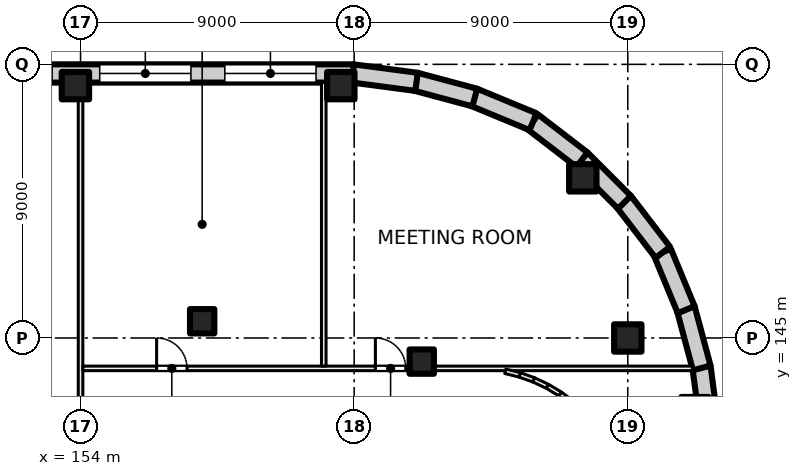
"""IFC4 building model, lengths in metres.
Left out: names, types, materials, properties, quantities, classifications, styles, units other than length and angle.
Written with IfcOpenShell. Run it as: python <this file> out.ifc"""

import sys

from ifc_helpers import new_model, si_unit, direction, frame, frame_2d, origin, origin_2d, place, context, subcontext, project, spatial, rectangle, extrude, element, fill, save


model = new_model("IFC4")
c1 = context("Model", 3, precision=1e-05, world=origin(), true_north=direction((0.0, 1.0)))
c2 = subcontext(c1, "Body", "Model", "MODEL_VIEW")
j1 = project(units=[si_unit("LENGTHUNIT", "METRE"), si_unit("PLANEANGLEUNIT", "RADIAN")], contexts=[c1])
p1 = place(None, origin())
s1 = spatial("IfcSite", under=j1, at=p1, CompositionType="ELEMENT")
p2 = place(p1, origin())
s2 = spatial("IfcBuilding", under=s1, at=p2, CompositionType="ELEMENT")
p3 = place(p2, frame((0.0, 0.0, 12.5)))
s3 = spatial("IfcBuildingStorey", under=s2, at=p3, CompositionType="ELEMENT", Elevation=12.5)
for number, where, z_axis, x_axis in (
    (1, (172.0, 145.0, 0.0), (0.0, 0.0, 1.0), (1.0, 0.0, 0.0)),
    (2, (153.831, 153.3, 0.0), (0.0, 0.0, 1.0), (1.0, 0.0, 0.0)),
    (3, (162.561, 153.3, 0.0), (0.0, 0.0, 1.0), (1.0, 0.0, 0.0)),
    (4, (170.521, 150.267, 0.0), (0.0, 0.0, 1.0), (1.0, 0.0, 0.0)),
):
    element("IfcColumn", number, at=place(p3, frame(where, z_axis=z_axis, x_axis=x_axis)), inside=s3, PredefinedType="COLUMN", context=c2, shape_type="SweptSolid", body=[
        extrude(rectangle(XDim=0.9, YDim=0.9, at=origin_2d()), origin(), (0.0, 0.0, 1.0), 5.0),
    ])
for number, where, z_axis, x_axis in (
    (5, (165.223, 144.223, 0.0), (0.0, 0.0, 1.0), (1.0, 0.0, 0.0)),
    (6, (158.0, 145.55, 0.0), (0.0, 0.0, 1.0), (1.0, 0.0, 0.0)),
):
    element("IfcColumn", number, at=place(p3, frame(where, z_axis=z_axis, x_axis=x_axis)), inside=s3, PredefinedType="COLUMN", context=c2, shape_type="SweptSolid", body=[
        extrude(rectangle(XDim=0.8, YDim=0.8, at=origin_2d()), origin(), (0.0, 0.0, 1.0), 5.0),
    ])
p4 = place(p3, frame((174.424, 144.052, 0.0), z_axis=(0.0, 0.0, 1.0), x_axis=(0.130558200013, -0.991440646942, 0.0)))
e7 = element("IfcWall", 7, at=p4, inside=s3, PredefinedType="SOLIDWALL", context=c2, shape_type="SweptSolid", body=[
    extrude(rectangle(XDim=2.132, YDim=0.6, at=frame_2d((1.066, 0.0))), origin(), (0.0, 0.0, 1.0), 4.6),
])
p5 = place(p3, frame((173.908, 145.968, 0.0), z_axis=(0.0, 0.0, 1.0), x_axis=(0.258804467146, -0.965929732323, 0.0)))
e8 = element("IfcWall", 8, at=p5, inside=s3, PredefinedType="SOLIDWALL", context=c2, shape_type="SweptSolid", body=[
    extrude(rectangle(XDim=2.022, YDim=0.6, at=frame_2d((1.011, 0.0))), origin(), (0.0, 0.0, 1.0), 4.6),
])
p6 = place(p3, frame((173.14, 147.819, 0.0), z_axis=(0.0, 0.0, 1.0), x_axis=(0.382341242798, -0.924021197839, 0.0)))
e9 = element("IfcWall", 9, at=p6, inside=s3, PredefinedType="SOLIDWALL", context=c2, shape_type="SweptSolid", body=[
    extrude(rectangle(XDim=2.044, YDim=0.6, at=frame_2d((1.022, 0.0))), origin(), (0.0, 0.0, 1.0), 4.6),
])
p7 = place(p3, frame((171.865, 149.493, 0.0), z_axis=(0.0, 0.0, 1.0), x_axis=(0.609052002567, -0.79313029079, 0.0)))
e10 = element("IfcWall", 10, at=p7, inside=s3, PredefinedType="SOLIDWALL", context=c2, shape_type="SweptSolid", body=[
    extrude(rectangle(XDim=2.114, YDim=0.6, at=frame_2d((1.057, 0.0))), origin(), (0.0, 0.0, 1.0), 4.6),
])
p8 = place(p3, frame((170.463, 150.89, 0.0), z_axis=(0.0, 0.0, 1.0), x_axis=(0.707106781187, -0.707106781187, 0.0)))
e11 = element("IfcWall", 11, at=p8, inside=s3, PredefinedType="SOLIDWALL", context=c2, shape_type="SweptSolid", body=[
    extrude(rectangle(XDim=2.018, YDim=0.6, at=frame_2d((1.009, 0.0))), origin(), (0.0, 0.0, 1.0), 4.6),
])
p9 = place(p3, frame((168.872, 152.109, 0.0), z_axis=(0.0, 0.0, 1.0), x_axis=(0.793125485267, -0.609058260448, 0.0)))
e12 = element("IfcWall", 12, at=p9, inside=s3, PredefinedType="SOLIDWALL", context=c2, shape_type="SweptSolid", body=[
    extrude(rectangle(XDim=2.044, YDim=0.6, at=frame_2d((1.022, 0.0))), origin(), (0.0, 0.0, 1.0), 4.6),
])
p10 = place(p3, frame((166.931, 152.921, 0.0), z_axis=(0.0, 0.0, 1.0), x_axis=(0.924006983526, -0.382375593358, 0.0)))
e13 = element("IfcWall", 13, at=p10, inside=s3, PredefinedType="SOLIDWALL", context=c2, shape_type="SweptSolid", body=[
    extrude(rectangle(XDim=2.114, YDim=0.6, at=frame_2d((1.057, 0.0))), origin(), (0.0, 0.0, 1.0), 4.6),
])
p11 = place(p3, frame((165.014, 153.432, 0.0), z_axis=(0.0, 0.0, 1.0), x_axis=(0.965929732323, -0.258804467146, 0.0)))
e14 = element("IfcWall", 14, at=p11, inside=s3, PredefinedType="SOLIDWALL", context=c2, shape_type="SweptSolid", body=[
    extrude(rectangle(XDim=2.022, YDim=0.6, at=frame_2d((1.011, 0.0))), origin(), (0.0, 0.0, 1.0), 4.6),
])
p12 = place(p3, frame((162.939, 153.703, 0.0), z_axis=(0.0, 0.0, 1.0), x_axis=(0.991440646942, -0.130558200013, 0.0)))
e15 = element("IfcWall", 15, at=p12, inside=s3, PredefinedType="SOLIDWALL", context=c2, shape_type="SweptSolid", body=[
    extrude(rectangle(XDim=2.132, YDim=0.6, at=frame_2d((1.066, 0.0))), origin(), (0.0, 0.0, 1.0), 4.6),
])
p13 = place(p3, frame((131.022, 153.7, 0.0), z_axis=(0.0, 0.0, 1.0), x_axis=(1.0, 0.0, 0.0)))
e16 = element("IfcWall", 16, at=p13, inside=s3, PredefinedType="SOLIDWALL", context=c2, shape_type="SweptSolid", body=[
    extrude(rectangle(XDim=31.957, YDim=0.6, at=frame_2d((15.978, 0.0))), origin(), (0.0, 0.0, 1.0), 4.6),
])
p14 = place(p13, frame((0.783, 0.0, 0.9)))
e17 = element("IfcOpeningElement", 17, at=p14, cuts=e16, PredefinedType="OPENING", context=c2, shape_type="SweptSolid", body=[
    extrude(rectangle(XDim=3.0, YDim=3.0, at=frame_2d((1.5, 1.5))), frame((0.0, 0.31, 0.0), z_axis=(0.0, -1.0, 0.0), x_axis=(1.0, 0.0, 0.0)), (0.0, 0.0, 1.0), 0.62),
])
p15 = place(p13, frame((9.913, 0.0, 0.9)))
e18 = element("IfcOpeningElement", 18, at=p15, cuts=e16, PredefinedType="OPENING", context=c2, shape_type="SweptSolid", body=[
    extrude(rectangle(XDim=3.0, YDim=3.0, at=frame_2d((1.5, 1.5))), frame((0.0, 0.31, 0.0), z_axis=(0.0, -1.0, 0.0), x_axis=(1.0, 0.0, 0.0)), (0.0, 0.0, 1.0), 0.62),
])
p16 = place(p13, frame((14.928, 0.0, 0.9)))
e19 = element("IfcOpeningElement", 19, at=p16, cuts=e16, PredefinedType="OPENING", context=c2, shape_type="SweptSolid", body=[
    extrude(rectangle(XDim=3.0, YDim=3.0, at=frame_2d((1.5, 1.5))), frame((0.0, 0.31, 0.0), z_axis=(0.0, -1.0, 0.0), x_axis=(1.0, 0.0, 0.0)), (0.0, 0.0, 1.0), 0.62),
])
p17 = place(p13, frame((19.043, 0.0, 0.9)))
e20 = element("IfcOpeningElement", 20, at=p17, cuts=e16, PredefinedType="OPENING", context=c2, shape_type="SweptSolid", body=[
    extrude(rectangle(XDim=3.0, YDim=3.0, at=frame_2d((1.5, 1.5))), frame((0.0, 0.31, 0.0), z_axis=(0.0, -1.0, 0.0), x_axis=(1.0, 0.0, 0.0)), (0.0, 0.0, 1.0), 0.62),
])
p18 = place(p13, frame((23.609, 0.0, 0.9)))
e21 = element("IfcOpeningElement", 21, at=p18, cuts=e16, PredefinedType="OPENING", context=c2, shape_type="SweptSolid", body=[
    extrude(rectangle(XDim=3.0, YDim=3.0, at=frame_2d((1.5, 1.5))), frame((0.0, 0.31, 0.0), z_axis=(0.0, -1.0, 0.0), x_axis=(1.0, 0.0, 0.0)), (0.0, 0.0, 1.0), 0.62),
])
p19 = place(p13, frame((27.724, 0.0, 0.9)))
e22 = element("IfcOpeningElement", 22, at=p19, cuts=e16, PredefinedType="OPENING", context=c2, shape_type="SweptSolid", body=[
    extrude(rectangle(XDim=3.0, YDim=3.0, at=frame_2d((1.5, 1.5))), frame((0.0, 0.31, 0.0), z_axis=(0.0, -1.0, 0.0), x_axis=(1.0, 0.0, 0.0)), (0.0, 0.0, 1.0), 0.62),
])
p20 = place(p3, frame((154.0, 153.4, 0.0), z_axis=(0.0, 0.0, 1.0), x_axis=(0.0, -1.0, 0.0)))
e23 = element("IfcWall", 23, at=p20, inside=s3, PredefinedType="PARTITIONING", context=c2, shape_type="SweptSolid", body=[
    extrude(rectangle(XDim=14.4, YDim=0.15, at=frame_2d((7.2, 0.0))), origin(), (0.0, 0.0, 1.0), 4.6),
])
p21 = place(p20, frame((11.0, 0.0, 0.0)))
e24 = element("IfcOpeningElement", 24, at=p21, cuts=e23, PredefinedType="OPENING", context=c2, shape_type="SweptSolid", body=[
    extrude(rectangle(XDim=1.8, YDim=2.1, at=frame_2d((0.9, 1.05))), frame((0.0, 0.085, 0.0), z_axis=(0.0, -1.0, 0.0), x_axis=(1.0, 0.0, 0.0)), (0.0, 0.0, 1.0), 0.17),
])
p22 = place(p3, frame((154.075, 144.0, 0.0), z_axis=(0.0, 0.0, 1.0), x_axis=(1.0, 0.0, 0.0)))
e25 = element("IfcWall", 25, at=p22, inside=s3, PredefinedType="PARTITIONING", context=c2, shape_type="SweptSolid", body=[
    extrude(rectangle(XDim=20.05, YDim=0.15, at=frame_2d((10.025, 0.0))), origin(), (0.0, 0.0, 1.0), 4.6),
])
p23 = place(p22, frame((2.427, 0.0, 0.0)))
e26 = element("IfcOpeningElement", 26, at=p23, cuts=e25, PredefinedType="OPENING", context=c2, shape_type="SweptSolid", body=[
    extrude(rectangle(XDim=1.0, YDim=2.1, at=frame_2d((0.5, 1.05))), frame((0.0, 0.085, 0.0), z_axis=(0.0, -1.0, 0.0), x_axis=(1.0, 0.0, 0.0)), (0.0, 0.0, 1.0), 0.17),
])
p24 = place(p22, frame((9.623, 0.0, 0.0)))
e27 = element("IfcOpeningElement", 27, at=p24, cuts=e25, PredefinedType="OPENING", context=c2, shape_type="SweptSolid", body=[
    extrude(rectangle(XDim=1.0, YDim=2.1, at=frame_2d((0.5, 1.05))), frame((0.0, 0.085, 0.0), z_axis=(0.0, -1.0, 0.0), x_axis=(1.0, 0.0, 0.0)), (0.0, 0.0, 1.0), 0.17),
])
p25 = place(p3, frame((162.0, 144.075, 0.0), z_axis=(0.0, 0.0, 1.0), x_axis=(0.0, 1.0, 0.0)))
e28 = element("IfcWall", 28, at=p25, inside=s3, PredefinedType="PARTITIONING", context=c2, shape_type="SweptSolid", body=[
    extrude(rectangle(XDim=9.325, YDim=0.15, at=frame_2d((4.663, 0.0))), origin(), (0.0, 0.0, 1.0), 4.6),
])
p26 = place(p3, frame((167.971, 143.905, 0.0), z_axis=(0.0, 0.0, 1.0), x_axis=(0.970113715952, -0.242650732785, 0.0)))
e29 = element("IfcWall", 29, at=p26, inside=s3, PredefinedType="PARTITIONING", context=c2, shape_type="SweptSolid", body=[
    extrude(rectangle(XDim=0.499, YDim=0.15, at=frame_2d((0.25, 0.0))), origin(), (0.0, 0.0, 1.0), 4.6),
])
for number, where, z_axis, x_axis in (
    (30, (168.447, 143.786, 0.0), (0.0, 0.0, 1.0), (0.941, -0.337, 0.0)),
    (31, (168.91, 143.621, 0.0), (0.0, 0.0, 1.0), (0.904, -0.428, 0.0)),
):
    element("IfcWall", number, at=place(p3, frame(where, z_axis=z_axis, x_axis=x_axis)), inside=s3, PredefinedType="PARTITIONING", context=c2, shape_type="SweptSolid", body=[
        extrude(rectangle(XDim=0.498, YDim=0.15, at=frame_2d((0.249, 0.0))), origin(), (0.0, 0.0, 1.0), 4.6),
    ])
p27 = place(p3, frame((169.354, 143.412, 0.0), z_axis=(0.0, 0.0, 1.0), x_axis=(0.85671397893, -0.515791778052, 0.0)))
e32 = element("IfcWall", 32, at=p27, inside=s3, PredefinedType="PARTITIONING", context=c2, shape_type="SweptSolid", body=[
    extrude(rectangle(XDim=0.499, YDim=0.15, at=frame_2d((0.249, 0.0))), origin(), (0.0, 0.0, 1.0), 4.6),
])
p28 = place(p3, frame((169.775, 143.159, 0.0), z_axis=(0.0, 0.0, 1.0), x_axis=(0.80404358372, -0.594570362092, 0.0)))
e33 = element("IfcWall", 33, at=p28, inside=s3, PredefinedType="PARTITIONING", context=c2, shape_type="SweptSolid", body=[
    extrude(rectangle(XDim=0.498, YDim=0.15, at=frame_2d((0.249, 0.0))), origin(), (0.0, 0.0, 1.0), 4.6),
])
p29 = place(p18, origin())
e34 = element("IfcWindow", 34, at=p29, inside=s3, PartitioningType="SINGLE_PANEL", PredefinedType="WINDOW", context=c2, shape_type="SweptSolid", body=[
    extrude(rectangle(XDim=3.0, YDim=3.0, at=frame_2d((1.5, 1.5))), frame((0.0, 0.03, 0.0), z_axis=(0.0, -1.0, 0.0), x_axis=(1.0, 0.0, 0.0)), (0.0, 0.0, 1.0), 0.06),
])
fill(e21, e34)
p30 = place(p19, origin())
e35 = element("IfcWindow", 35, at=p30, inside=s3, PartitioningType="SINGLE_PANEL", PredefinedType="WINDOW", context=c2, shape_type="SweptSolid", body=[
    extrude(rectangle(XDim=3.0, YDim=3.0, at=frame_2d((1.5, 1.5))), frame((0.0, 0.03, 0.0), z_axis=(0.0, -1.0, 0.0), x_axis=(1.0, 0.0, 0.0)), (0.0, 0.0, 1.0), 0.06),
])
fill(e22, e35)
p31 = place(p23, origin())
e36 = element("IfcDoor", 36, at=p31, inside=s3, OperationType="SINGLE_SWING_LEFT", PredefinedType="DOOR", context=c2, shape_type="SweptSolid", body=[
    extrude(rectangle(XDim=1.0, YDim=2.1, at=frame_2d((0.5, 1.05))), frame((0.0, 0.025, 0.0), z_axis=(0.0, -1.0, 0.0), x_axis=(1.0, 0.0, 0.0)), (0.0, 0.0, 1.0), 0.05),
])
fill(e26, e36)
p32 = place(p24, origin())
e37 = element("IfcDoor", 37, at=p32, inside=s3, OperationType="SINGLE_SWING_LEFT", PredefinedType="DOOR", context=c2, shape_type="SweptSolid", body=[
    extrude(rectangle(XDim=1.0, YDim=2.1, at=frame_2d((0.5, 1.05))), frame((0.0, 0.025, 0.0), z_axis=(0.0, -1.0, 0.0), x_axis=(1.0, 0.0, 0.0)), (0.0, 0.0, 1.0), 0.05),
])
fill(e27, e37)
save(model, sys.argv[1])
